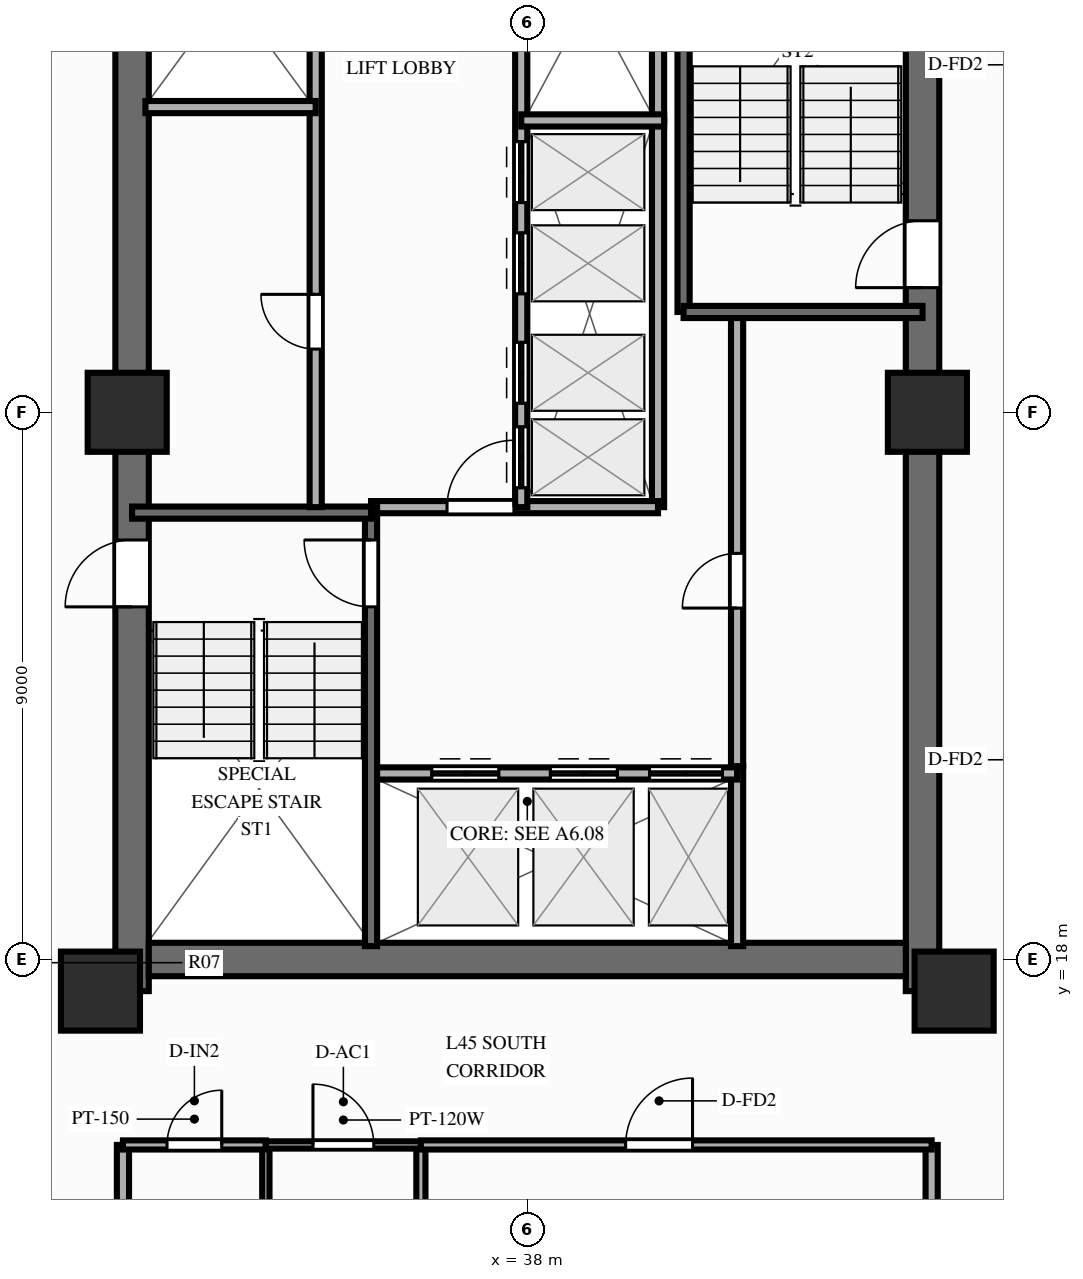
"""IFC4 building model, lengths in metres.
Left out: names, types, materials, properties, quantities, classifications, styles, units other than length and angle.
Written with IfcOpenShell. Run it as: python <this file> out.ifc"""

import sys

from ifc_helpers import new_model, si_unit, direction, frame, frame_2d, origin, origin_2d, place, context, subcontext, project, spatial, rectangle, extrude, source, transform, mapped, element, fill, save


model = new_model("IFC4")
c1 = context("Model", 3, precision=1e-05, world=origin(), true_north=direction((0.0, 1.0)))
c2 = subcontext(c1, "Body", "Model", "MODEL_VIEW")
j1 = project(units=[si_unit("LENGTHUNIT", "METRE"), si_unit("PLANEANGLEUNIT", "RADIAN")], contexts=[c1])
p1 = place(None, origin())
s1 = spatial("IfcSite", under=j1, at=p1, CompositionType="ELEMENT")
p2 = place(p1, origin())
s2 = spatial("IfcBuilding", under=s1, at=p2, CompositionType="ELEMENT")
p3 = place(p2, frame((0.0, 0.0, 141.75)))
s3 = spatial("IfcBuildingStorey", under=s2, at=p3, CompositionType="ELEMENT", Elevation=141.75)
p4 = place(p3, frame((31.5, 17.48, 0.0), z_axis=(0.0, 0.0, 1.0), x_axis=(0.0, 1.0, 0.0)))
e1 = element("IfcWall", 1, at=p4, inside=s3, PredefinedType="SHEAR", context=c2, shape_type="SweptSolid", body=[
    extrude(rectangle(XDim=19.04, YDim=0.55, at=frame_2d((9.52, 0.0))), origin(), (0.0, 0.0, 1.0), 3.0),
])
p5 = place(p4, frame((6.32, 0.0, 0.0)))
e2 = element("IfcOpeningElement", 2, at=p5, cuts=e1, PredefinedType="OPENING", context=c2, shape_type="SweptSolid", body=[
    extrude(rectangle(XDim=1.1, YDim=2.15, at=frame_2d((0.55, 1.075))), frame((0.0, 0.287, 0.0), z_axis=(0.0, -1.0, 0.0), x_axis=(1.0, 0.0, 0.0)), (0.0, 0.0, 1.0), 0.574),
])
p6 = place(p3, frame((44.5, 17.48, 0.0), z_axis=(0.0, 0.0, 1.0), x_axis=(0.0, 1.0, 0.0)))
e3 = element("IfcWall", 3, at=p6, inside=s3, PredefinedType="SHEAR", context=c2, shape_type="SweptSolid", body=[
    extrude(rectangle(XDim=19.04, YDim=0.55, at=frame_2d((9.52, 0.0))), origin(), (0.0, 0.0, 1.0), 3.0),
])
p7 = place(p6, frame((12.67, 0.0, 0.0), z_axis=(0.0, 0.0, 1.0), x_axis=(-1.0, 0.0, 0.0)))
e4 = element("IfcOpeningElement", 4, at=p7, cuts=e3, PredefinedType="OPENING", context=c2, shape_type="SweptSolid", body=[
    extrude(rectangle(XDim=1.1, YDim=2.15, at=frame_2d((0.55, 1.075))), frame((0.0, 0.287, 0.0), z_axis=(0.0, -1.0, 0.0), x_axis=(1.0, 0.0, 0.0)), (0.0, 0.0, 1.0), 0.574),
])
p8 = place(p3, frame((31.775, 18.0, 0.0), z_axis=(0.0, 0.0, 1.0), x_axis=(1.0, 0.0, 0.0)))
e5 = element("IfcWall", 5, at=p8, inside=s3, PredefinedType="SHEAR", context=c2, shape_type="SweptSolid", body=[
    extrude(rectangle(XDim=12.45, YDim=0.55, at=frame_2d((6.225, 0.0))), origin(), (0.0, 0.0, 1.0), 3.0),
])
m1 = source(origin(), c2, "Body", "SweptSolid", [
    extrude(rectangle(XDim=1.3, YDim=1.3, at=origin_2d()), origin(), (0.0, 0.0, 1.0), 3.0),
])
for number, where, z_axis, x_axis in (
    (6, (30.98, 17.48, 0.0), (0.0, 0.0, 1.0), (1.0, 0.0, 0.0)),
    (7, (45.02, 17.48, 0.0), (0.0, 0.0, 1.0), (1.0, 0.0, 0.0)),
    (8, (31.42, 27.0, 0.0), (0.0, 0.0, 1.0), (1.0, 0.0, 0.0)),
    (9, (44.58, 27.0, 0.0), (0.0, 0.0, 1.0), (1.0, 0.0, 0.0)),
):
    element("IfcColumn", number, at=place(p3, frame(where, z_axis=z_axis, x_axis=x_axis)), inside=s3, PredefinedType="COLUMN", context=c2, shape_type="MappedRepresentation", body=[
        mapped(m1, transform((0.0, 0.0, 0.0), scale=1.0)),
    ])
p9 = place(p3, frame((41.45, 18.22, 0.0), z_axis=(0.0, 0.0, 1.0), x_axis=(0.0, 1.0, 0.0)))
e10 = element("IfcWall", 10, at=p9, inside=s3, PredefinedType="PARTITIONING", context=c2, shape_type="SweptSolid", body=[
    extrude(rectangle(XDim=2.96, YDim=0.2, at=frame_2d((1.48, 0.0))), origin(), (0.0, 0.0, 1.0), 2.7),
])
p10 = place(p3, frame((41.45, 21.18, 0.0), z_axis=(0.0, 0.0, 1.0), x_axis=(0.0, 1.0, 0.0)))
e11 = element("IfcWall", 11, at=p10, inside=s3, PredefinedType="PARTITIONING", context=c2, shape_type="SweptSolid", body=[
    extrude(rectangle(XDim=7.42, YDim=0.2, at=frame_2d((3.71, 0.0))), origin(), (0.0, 0.0, 1.0), 2.7),
])
p11 = place(p10, frame((2.6, 0.0, 0.0)))
e12 = element("IfcOpeningElement", 12, at=p11, cuts=e11, PredefinedType="OPENING", context=c2, shape_type="SweptSolid", body=[
    extrude(rectangle(XDim=0.9, YDim=2.1, at=frame_2d((0.45, 1.05))), frame((0.0, 0.112, 0.0), z_axis=(0.0, -1.0, 0.0), x_axis=(1.0, 0.0, 0.0)), (0.0, 0.0, 1.0), 0.224),
])
p12 = place(p3, frame((40.15, 25.44, 0.0), z_axis=(0.0, 0.0, 1.0), x_axis=(0.0, 1.0, 0.0)))
e13 = element("IfcWall", 13, at=p12, inside=s3, PredefinedType="PARTITIONING", context=c2, shape_type="SweptSolid", body=[
    extrude(rectangle(XDim=6.36, YDim=0.2, at=frame_2d((3.18, 0.0))), origin(), (0.0, 0.0, 1.0), 2.7),
])
p13 = place(p3, frame((40.15, 31.8, 0.0), z_axis=(0.0, 0.0, 1.0), x_axis=(0.0, 1.0, 0.0)))
e14 = element("IfcWall", 14, at=p13, inside=s3, PredefinedType="PARTITIONING", context=c2, shape_type="SweptSolid", body=[
    extrude(rectangle(XDim=3.98, YDim=0.2, at=frame_2d((1.99, 0.0))), origin(), (0.0, 0.0, 1.0), 2.7),
])
p14 = place(p3, frame((35.43, 21.06, 0.0), z_axis=(0.0, 0.0, 1.0), x_axis=(1.0, 0.0, 0.0)))
e15 = element("IfcWall", 15, at=p14, inside=s3, PredefinedType="PARTITIONING", context=c2, shape_type="SweptSolid", body=[
    extrude(rectangle(XDim=6.02, YDim=0.2, at=frame_2d((3.01, 0.0))), origin(), (0.0, 0.0, 1.0), 2.7),
])
p15 = place(p14, frame((1.0, 0.0, 0.0)))
e16 = element("IfcOpeningElement", 16, at=p15, cuts=e15, PredefinedType="OPENING", context=c2, shape_type="SweptSolid", body=[
    extrude(rectangle(XDim=1.1, YDim=2.15, at=frame_2d((0.55, 1.075))), frame((0.0, 0.112, 0.0), z_axis=(0.0, -1.0, 0.0), x_axis=(1.0, 0.0, 0.0)), (0.0, 0.0, 1.0), 0.224),
])
p16 = place(p14, frame((2.95, 0.0, 0.0)))
e17 = element("IfcOpeningElement", 17, at=p16, cuts=e15, PredefinedType="OPENING", context=c2, shape_type="SweptSolid", body=[
    extrude(rectangle(XDim=1.1, YDim=2.15, at=frame_2d((0.55, 1.075))), frame((0.0, 0.112, 0.0), z_axis=(0.0, -1.0, 0.0), x_axis=(1.0, 0.0, 0.0)), (0.0, 0.0, 1.0), 0.224),
])
p17 = place(p14, frame((4.58, 0.0, 0.0)))
e18 = element("IfcOpeningElement", 18, at=p17, cuts=e15, PredefinedType="OPENING", context=c2, shape_type="SweptSolid", body=[
    extrude(rectangle(XDim=1.2, YDim=2.15, at=frame_2d((0.6, 1.075))), frame((0.0, 0.112, 0.0), z_axis=(0.0, -1.0, 0.0), x_axis=(1.0, 0.0, 0.0)), (0.0, 0.0, 1.0), 0.224),
])
p18 = place(p3, frame((35.43, 25.44, 0.0), z_axis=(0.0, 0.0, 1.0), x_axis=(1.0, 0.0, 0.0)))
e19 = element("IfcWall", 19, at=p18, inside=s3, PredefinedType="PARTITIONING", context=c2, shape_type="SweptSolid", body=[
    extrude(rectangle(XDim=4.72, YDim=0.2, at=frame_2d((2.36, 0.0))), origin(), (0.0, 0.0, 1.0), 2.7),
])
p19 = place(p18, frame((1.25, 0.0, 0.0)))
e20 = element("IfcOpeningElement", 20, at=p19, cuts=e19, PredefinedType="OPENING", context=c2, shape_type="SweptSolid", body=[
    extrude(rectangle(XDim=1.1, YDim=2.15, at=frame_2d((0.55, 1.075))), frame((0.0, 0.112, 0.0), z_axis=(0.0, -1.0, 0.0), x_axis=(1.0, 0.0, 0.0)), (0.0, 0.0, 1.0), 0.224),
])
p20 = place(p3, frame((35.43, 18.22, 0.0), z_axis=(0.0, 0.0, 1.0), x_axis=(0.0, 1.0, 0.0)))
e21 = element("IfcWall", 21, at=p20, inside=s3, PredefinedType="SOLIDWALL", context=c2, shape_type="SweptSolid", body=[
    extrude(rectangle(XDim=7.22, YDim=0.2, at=frame_2d((3.61, 0.0))), origin(), (0.0, 0.0, 1.0), 2.7),
])
p21 = place(p20, frame((6.68, 0.0, 0.0), z_axis=(0.0, 0.0, 1.0), x_axis=(-1.0, 0.0, 0.0)))
e22 = element("IfcOpeningElement", 22, at=p21, cuts=e21, PredefinedType="OPENING", context=c2, shape_type="SweptSolid", body=[
    extrude(rectangle(XDim=1.1, YDim=2.15, at=frame_2d((0.55, 1.075))), frame((0.0, 0.112, 0.0), z_axis=(0.0, -1.0, 0.0), x_axis=(1.0, 0.0, 0.0)), (0.0, 0.0, 1.0), 0.224),
])
p22 = place(p3, frame((31.5, 25.35, 0.0), z_axis=(0.0, 0.0, 1.0), x_axis=(1.0, 0.0, 0.0)))
e23 = element("IfcWall", 23, at=p22, inside=s3, PredefinedType="SOLIDWALL", context=c2, shape_type="SweptSolid", body=[
    extrude(rectangle(XDim=3.93, YDim=0.2, at=frame_2d((1.965, 0.0))), origin(), (0.0, 0.0, 1.0), 2.7),
])
p23 = place(p3, frame((40.57, 28.65, 0.0), z_axis=(0.0, 0.0, 1.0), x_axis=(0.0, 1.0, 0.0)))
e24 = element("IfcWall", 24, at=p23, inside=s3, PredefinedType="SOLIDWALL", context=c2, shape_type="SweptSolid", body=[
    extrude(rectangle(XDim=7.05, YDim=0.2, at=frame_2d((3.525, 0.0))), origin(), (0.0, 0.0, 1.0), 2.7),
])
p24 = place(p3, frame((40.57, 28.65, 0.0), z_axis=(0.0, 0.0, 1.0), x_axis=(1.0, 0.0, 0.0)))
e25 = element("IfcWall", 25, at=p24, inside=s3, PredefinedType="SOLIDWALL", context=c2, shape_type="SweptSolid", body=[
    extrude(rectangle(XDim=3.93, YDim=0.2, at=frame_2d((1.965, 0.0))), origin(), (0.0, 0.0, 1.0), 2.7),
])
p25 = place(p3, frame((34.52, 25.44, 0.0), z_axis=(0.0, 0.0, 1.0), x_axis=(0.0, 1.0, 0.0)))
e26 = element("IfcWall", 26, at=p25, inside=s3, PredefinedType="PARTITIONING", context=c2, shape_type="SweptSolid", body=[
    extrude(rectangle(XDim=10.34, YDim=0.2, at=frame_2d((5.17, 0.0))), origin(), (0.0, 0.0, 1.0), 2.7),
])
p26 = place(p25, frame((2.6, 0.0, 0.0)))
e27 = element("IfcOpeningElement", 27, at=p26, cuts=e26, PredefinedType="OPENING", context=c2, shape_type="SweptSolid", body=[
    extrude(rectangle(XDim=0.9, YDim=2.1, at=frame_2d((0.45, 1.05))), frame((0.0, 0.112, 0.0), z_axis=(0.0, -1.0, 0.0), x_axis=(1.0, 0.0, 0.0)), (0.0, 0.0, 1.0), 0.224),
])
p27 = place(p3, frame((31.72, 32.02, 0.0), z_axis=(0.0, 0.0, 1.0), x_axis=(1.0, 0.0, 0.0)))
e28 = element("IfcWall", 28, at=p27, inside=s3, PredefinedType="PARTITIONING", context=c2, shape_type="SweptSolid", body=[
    extrude(rectangle(XDim=2.8, YDim=0.2, at=frame_2d((1.4, 0.0))), origin(), (0.0, 0.0, 1.0), 2.7),
])
p28 = place(p3, frame((37.9, 25.44, 0.0), z_axis=(0.0, 0.0, 1.0), x_axis=(0.0, 1.0, 0.0)))
e29 = element("IfcWall", 29, at=p28, inside=s3, PredefinedType="PARTITIONING", context=c2, shape_type="SweptSolid", body=[
    extrude(rectangle(XDim=10.34, YDim=0.2, at=frame_2d((5.17, 0.0))), origin(), (0.0, 0.0, 1.0), 2.7),
])
p29 = place(p28, frame((0.32, 0.0, 0.0)))
e30 = element("IfcOpeningElement", 30, at=p29, cuts=e29, PredefinedType="OPENING", context=c2, shape_type="SweptSolid", body=[
    extrude(rectangle(XDim=1.0, YDim=2.15, at=frame_2d((0.5, 1.075))), frame((0.0, 0.112, 0.0), z_axis=(0.0, -1.0, 0.0), x_axis=(1.0, 0.0, 0.0)), (0.0, 0.0, 1.0), 0.224),
])
p30 = place(p28, frame((1.71, 0.0, 0.0)))
e31 = element("IfcOpeningElement", 31, at=p30, cuts=e29, PredefinedType="OPENING", context=c2, shape_type="SweptSolid", body=[
    extrude(rectangle(XDim=1.0, YDim=2.15, at=frame_2d((0.5, 1.075))), frame((0.0, 0.112, 0.0), z_axis=(0.0, -1.0, 0.0), x_axis=(1.0, 0.0, 0.0)), (0.0, 0.0, 1.0), 0.224),
])
p31 = place(p28, frame((3.51, 0.0, 0.0)))
e32 = element("IfcOpeningElement", 32, at=p31, cuts=e29, PredefinedType="OPENING", context=c2, shape_type="SweptSolid", body=[
    extrude(rectangle(XDim=1.0, YDim=2.15, at=frame_2d((0.5, 1.075))), frame((0.0, 0.112, 0.0), z_axis=(0.0, -1.0, 0.0), x_axis=(1.0, 0.0, 0.0)), (0.0, 0.0, 1.0), 0.224),
])
p32 = place(p28, frame((5.01, 0.0, 0.0)))
e33 = element("IfcOpeningElement", 33, at=p32, cuts=e29, PredefinedType="OPENING", context=c2, shape_type="SweptSolid", body=[
    extrude(rectangle(XDim=1.0, YDim=2.15, at=frame_2d((0.5, 1.075))), frame((0.0, 0.112, 0.0), z_axis=(0.0, -1.0, 0.0), x_axis=(1.0, 0.0, 0.0)), (0.0, 0.0, 1.0), 0.224),
])
p33 = place(p3, frame((37.9, 31.8, 0.0), z_axis=(0.0, 0.0, 1.0), x_axis=(1.0, 0.0, 0.0)))
e34 = element("IfcWall", 34, at=p33, inside=s3, PredefinedType="PARTITIONING", context=c2, shape_type="SweptSolid", body=[
    extrude(rectangle(XDim=2.35, YDim=0.2, at=frame_2d((1.175, 0.0))), origin(), (0.0, 0.0, 1.0), 2.7),
])
for number, where, z_axis, x_axis in (
    (35, (31.35, 14.95, 0.0), (0.0, 0.0, 1.0), (0.0, -1.0, 0.0)),
    (36, (44.65, 14.95, 0.0), (0.0, 0.0, 1.0), (0.0, -1.0, 0.0)),
):
    element("IfcWall", number, at=place(p3, frame(where, z_axis=z_axis, x_axis=x_axis)), inside=s3, PredefinedType="PARTITIONING", context=c2, shape_type="SweptSolid", body=[
        extrude(rectangle(XDim=11.8, YDim=0.2, at=frame_2d((5.9, 0.0))), origin(), (0.0, 0.0, 1.0), 2.34),
    ])
p34 = place(p3, frame((33.7, 14.95, 0.0), z_axis=(0.0, 0.0, 1.0), x_axis=(0.0, -1.0, 0.0)))
e37 = element("IfcWall", 37, at=p34, inside=s3, PredefinedType="PARTITIONING", context=c2, shape_type="SweptSolid", body=[
    extrude(rectangle(XDim=3.6, YDim=0.12, at=frame_2d((1.8, 0.0))), origin(), (0.0, 0.0, 1.0), 2.7),
])
p35 = place(p3, frame((36.25, 14.95, 0.0), z_axis=(0.0, 0.0, 1.0), x_axis=(0.0, -1.0, 0.0)))
e38 = element("IfcWall", 38, at=p35, inside=s3, PredefinedType="PARTITIONING", context=c2, shape_type="SweptSolid", body=[
    extrude(rectangle(XDim=3.6, YDim=0.15, at=frame_2d((1.8, 0.0))), origin(), (0.0, 0.0, 1.0), 2.7),
])
p36 = place(p3, frame((31.35, 14.95, 0.0), z_axis=(0.0, 0.0, 1.0), x_axis=(1.0, 0.0, 0.0)))
e39 = element("IfcWall", 39, at=p36, inside=s3, PredefinedType="PARTITIONING", context=c2, shape_type="SweptSolid", body=[
    extrude(rectangle(XDim=2.35, YDim=0.15, at=frame_2d((1.175, 0.0))), origin(), (0.0, 0.0, 1.0), 2.7),
])
p37 = place(p36, frame((0.725, 0.0, 0.0)))
e40 = element("IfcOpeningElement", 40, at=p37, cuts=e39, PredefinedType="OPENING", context=c2, shape_type="SweptSolid", body=[
    extrude(rectangle(XDim=0.9, YDim=2.1, at=frame_2d((0.45, 1.05))), frame((0.0, 0.087, 0.0), z_axis=(0.0, -1.0, 0.0), x_axis=(1.0, 0.0, 0.0)), (0.0, 0.0, 1.0), 0.174),
])
p38 = place(p3, frame((33.7, 14.95, 0.0), z_axis=(0.0, 0.0, 1.0), x_axis=(1.0, 0.0, 0.0)))
e41 = element("IfcWall", 41, at=p38, inside=s3, PredefinedType="PARTITIONING", context=c2, shape_type="SweptSolid", body=[
    extrude(rectangle(XDim=2.55, YDim=0.12, at=frame_2d((1.275, 0.0))), origin(), (0.0, 0.0, 1.0), 2.7),
])
p39 = place(p38, frame((0.775, 0.0, 0.0)))
e42 = element("IfcOpeningElement", 42, at=p39, cuts=e41, PredefinedType="OPENING", context=c2, shape_type="SweptSolid", body=[
    extrude(rectangle(XDim=1.0, YDim=2.1, at=frame_2d((0.5, 1.05))), frame((0.0, 0.072, 0.0), z_axis=(0.0, -1.0, 0.0), x_axis=(1.0, 0.0, 0.0)), (0.0, 0.0, 1.0), 0.144),
])
p40 = place(p3, frame((36.25, 14.95, 0.0), z_axis=(0.0, 0.0, 1.0), x_axis=(1.0, 0.0, 0.0)))
e43 = element("IfcWall", 43, at=p40, inside=s3, PredefinedType="PARTITIONING", context=c2, shape_type="SweptSolid", body=[
    extrude(rectangle(XDim=8.4, YDim=0.15, at=frame_2d((4.2, 0.0))), origin(), (0.0, 0.0, 1.0), 2.7),
])
p41 = place(p40, frame((3.367, 0.0, 0.0)))
e44 = element("IfcOpeningElement", 44, at=p41, cuts=e43, PredefinedType="OPENING", context=c2, shape_type="SweptSolid", body=[
    extrude(rectangle(XDim=1.1, YDim=2.15, at=frame_2d((0.55, 1.075))), frame((0.0, 0.087, 0.0), z_axis=(0.0, -1.0, 0.0), x_axis=(1.0, 0.0, 0.0)), (0.0, 0.0, 1.0), 0.174),
])
m2 = source(origin(), c2, "Body", "SweptSolid", [
    extrude(rectangle(XDim=1.1, YDim=2.15, at=frame_2d((0.55, 1.075))), frame((0.0, 0.025, 0.0), z_axis=(0.0, -1.0, 0.0), x_axis=(1.0, 0.0, 0.0)), (0.0, 0.0, 1.0), 0.05),
])
p42 = place(p5, origin())
e45 = element("IfcDoor", 45, at=p42, inside=s3, OperationType="SINGLE_SWING_LEFT", PredefinedType="DOOR", context=c2, shape_type="MappedRepresentation", body=[
    mapped(m2, transform((0.0, 0.0, 0.0), scale=1.0)),
])
fill(e2, e45)
p43 = place(p7, origin())
e46 = element("IfcDoor", 46, at=p43, inside=s3, OperationType="SINGLE_SWING_RIGHT", PredefinedType="DOOR", context=c2, shape_type="MappedRepresentation", body=[
    mapped(m2, transform((0.0, 0.0, 0.0), scale=1.0)),
])
fill(e4, e46)
m3 = source(origin(), c2, "Body", "SweptSolid", [
    extrude(rectangle(XDim=0.9, YDim=2.1, at=frame_2d((0.45, 1.05))), frame((0.0, 0.025, 0.0), z_axis=(0.0, -1.0, 0.0), x_axis=(1.0, 0.0, 0.0)), (0.0, 0.0, 1.0), 0.05),
])
p44 = place(p11, origin())
e47 = element("IfcDoor", 47, at=p44, inside=s3, OperationType="SINGLE_SWING_LEFT", PredefinedType="DOOR", context=c2, shape_type="MappedRepresentation", body=[
    mapped(m3, transform((0.0, 0.0, 0.0), scale=1.0)),
])
fill(e12, e47)
p45 = place(p15, origin())
e48 = element("IfcDoor", 48, at=p45, inside=s3, OperationType="DOUBLE_DOOR_SLIDING", PredefinedType="DOOR", context=c2, shape_type="MappedRepresentation", body=[
    mapped(m2, transform((0.0, 0.0, 0.0), scale=1.0)),
])
fill(e16, e48)
p46 = place(p16, origin())
e49 = element("IfcDoor", 49, at=p46, inside=s3, OperationType="DOUBLE_DOOR_SLIDING", PredefinedType="DOOR", context=c2, shape_type="MappedRepresentation", body=[
    mapped(m2, transform((0.0, 0.0, 0.0), scale=1.0)),
])
fill(e17, e49)
m4 = source(origin(), c2, "Body", "SweptSolid", [
    extrude(rectangle(XDim=1.2, YDim=2.15, at=frame_2d((0.6, 1.075))), frame((0.0, 0.025, 0.0), z_axis=(0.0, -1.0, 0.0), x_axis=(1.0, 0.0, 0.0)), (0.0, 0.0, 1.0), 0.05),
])
p47 = place(p17, origin())
e50 = element("IfcDoor", 50, at=p47, inside=s3, OperationType="DOUBLE_DOOR_SLIDING", PredefinedType="DOOR", context=c2, shape_type="MappedRepresentation", body=[
    mapped(m4, transform((0.0, 0.0, 0.0), scale=1.0)),
])
fill(e18, e50)
p48 = place(p19, origin())
e51 = element("IfcDoor", 51, at=p48, inside=s3, OperationType="SINGLE_SWING_RIGHT", PredefinedType="DOOR", context=c2, shape_type="MappedRepresentation", body=[
    mapped(m2, transform((0.0, 0.0, 0.0), scale=1.0)),
])
fill(e20, e51)
p49 = place(p21, origin())
e52 = element("IfcDoor", 52, at=p49, inside=s3, OperationType="SINGLE_SWING_LEFT", PredefinedType="DOOR", context=c2, shape_type="MappedRepresentation", body=[
    mapped(m2, transform((0.0, 0.0, 0.0), scale=1.0)),
])
fill(e22, e52)
p50 = place(p26, origin())
e53 = element("IfcDoor", 53, at=p50, inside=s3, OperationType="SINGLE_SWING_RIGHT", PredefinedType="DOOR", context=c2, shape_type="MappedRepresentation", body=[
    mapped(m3, transform((0.0, 0.0, 0.0), scale=1.0)),
])
fill(e27, e53)
m5 = source(origin(), c2, "Body", "SweptSolid", [
    extrude(rectangle(XDim=1.0, YDim=2.15, at=frame_2d((0.5, 1.075))), frame((0.0, 0.025, 0.0), z_axis=(0.0, -1.0, 0.0), x_axis=(1.0, 0.0, 0.0)), (0.0, 0.0, 1.0), 0.05),
])
p51 = place(p29, origin())
e54 = element("IfcDoor", 54, at=p51, inside=s3, OperationType="DOUBLE_DOOR_SLIDING", PredefinedType="DOOR", context=c2, shape_type="MappedRepresentation", body=[
    mapped(m5, transform((0.0, 0.0, 0.0), scale=1.0)),
])
fill(e30, e54)
p52 = place(p30, origin())
e55 = element("IfcDoor", 55, at=p52, inside=s3, OperationType="DOUBLE_DOOR_SLIDING", PredefinedType="DOOR", context=c2, shape_type="MappedRepresentation", body=[
    mapped(m5, transform((0.0, 0.0, 0.0), scale=1.0)),
])
fill(e31, e55)
p53 = place(p31, origin())
e56 = element("IfcDoor", 56, at=p53, inside=s3, OperationType="DOUBLE_DOOR_SLIDING", PredefinedType="DOOR", context=c2, shape_type="MappedRepresentation", body=[
    mapped(m5, transform((0.0, 0.0, 0.0), scale=1.0)),
])
fill(e32, e56)
p54 = place(p32, origin())
e57 = element("IfcDoor", 57, at=p54, inside=s3, OperationType="DOUBLE_DOOR_SLIDING", PredefinedType="DOOR", context=c2, shape_type="MappedRepresentation", body=[
    mapped(m5, transform((0.0, 0.0, 0.0), scale=1.0)),
])
fill(e33, e57)
p55 = place(p37, origin())
e58 = element("IfcDoor", 58, at=p55, inside=s3, OperationType="SINGLE_SWING_RIGHT", PredefinedType="DOOR", context=c2, shape_type="MappedRepresentation", body=[
    mapped(m3, transform((0.0, 0.0, 0.0), scale=1.0)),
])
fill(e40, e58)
m6 = source(origin(), c2, "Body", "SweptSolid", [
    extrude(rectangle(XDim=1.0, YDim=2.1, at=frame_2d((0.5, 1.05))), frame((0.0, 0.025, 0.0), z_axis=(0.0, -1.0, 0.0), x_axis=(1.0, 0.0, 0.0)), (0.0, 0.0, 1.0), 0.05),
])
p56 = place(p39, origin())
e59 = element("IfcDoor", 59, at=p56, inside=s3, OperationType="SINGLE_SWING_LEFT", PredefinedType="DOOR", context=c2, shape_type="MappedRepresentation", body=[
    mapped(m6, transform((0.0, 0.0, 0.0), scale=1.0)),
])
fill(e42, e59)
p57 = place(p41, origin())
e60 = element("IfcDoor", 60, at=p57, inside=s3, OperationType="SINGLE_SWING_RIGHT", PredefinedType="DOOR", context=c2, shape_type="MappedRepresentation", body=[
    mapped(m2, transform((0.0, 0.0, 0.0), scale=1.0)),
])
fill(e44, e60)
save(model, sys.argv[1])
